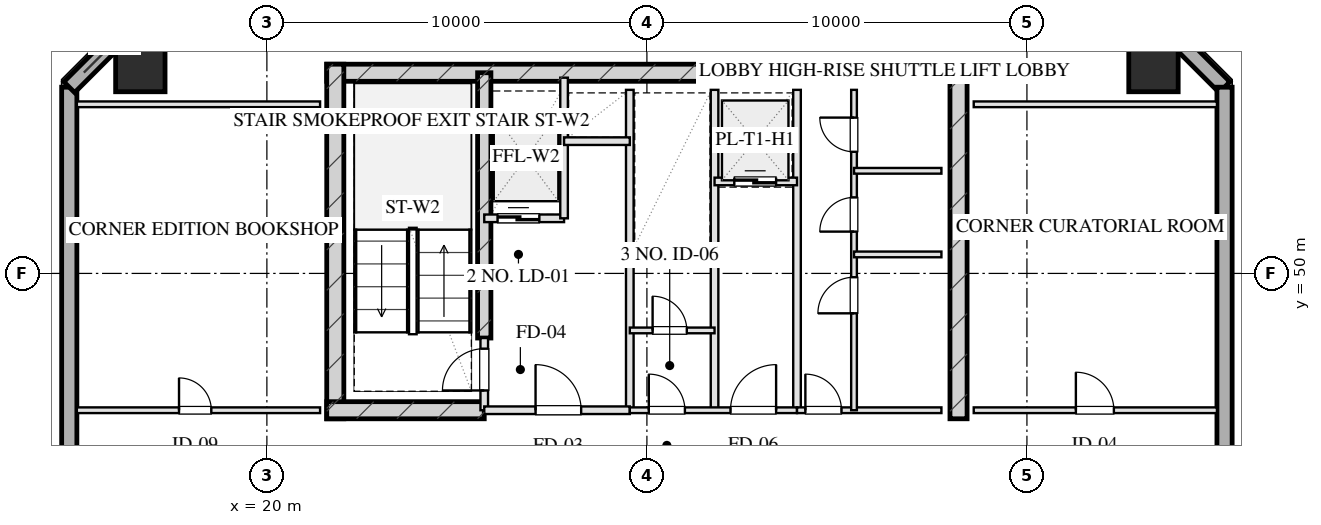
"""IFC4 building model, lengths in metres.
Left out: names, types, materials, properties, quantities, classifications, styles, units other than length and angle.
Written with IfcOpenShell. Run it as: python <this file> out.ifc"""

import sys

from ifc_helpers import new_model, si_unit, direction, frame, frame_2d, origin, origin_2d, place, context, subcontext, project, spatial, rectangle, hollow_rectangle, extrude, element, fill, save


model = new_model("IFC4")
c1 = context("Model", 3, precision=1e-05, world=origin(), true_north=direction((0.0, 1.0)))
c2 = subcontext(c1, "Body", "Model", "MODEL_VIEW")
j1 = project(units=[si_unit("LENGTHUNIT", "METRE"), si_unit("PLANEANGLEUNIT", "RADIAN")], contexts=[c1])
p1 = place(None, origin())
s1 = spatial("IfcSite", under=j1, at=p1, CompositionType="ELEMENT")
p2 = place(p1, origin())
s2 = spatial("IfcBuilding", under=s1, at=p2, CompositionType="ELEMENT")
p3 = place(p2, frame((0.0, 0.0, 244.0)))
s3 = spatial("IfcBuildingStorey", under=s2, at=p3, CompositionType="ELEMENT", Elevation=244.0)
p4 = place(p3, frame((21.575, 55.28, 0.0), z_axis=(0.0, 0.0, 1.0), x_axis=(1.0, 0.0, 0.0)))
e1 = element("IfcWall", 1, at=p4, inside=s3, PredefinedType="SHEAR", context=c2, shape_type="SweptSolid", body=[
    extrude(rectangle(XDim=16.85, YDim=0.45, at=frame_2d((8.425, 0.0))), origin(), (0.0, 0.0, 1.0), 3.2),
])
for number, where, z_axis, x_axis in (
    (2, (21.8, 46.175, 0.0), (0.0, 0.0, 1.0), (0.0, 1.0, 0.0)),
    (3, (38.2, 46.175, 0.0), (0.0, 0.0, 1.0), (0.0, 1.0, 0.0)),
):
    element("IfcWall", number, at=place(p3, frame(where, z_axis=z_axis, x_axis=x_axis)), inside=s3, PredefinedType="SHEAR", context=c2, shape_type="SweptSolid", body=[
        extrude(rectangle(XDim=9.33, YDim=0.45, at=frame_2d((4.665, 0.0))), origin(), (0.0, 0.0, 1.0), 3.2),
    ])
p5 = place(p3, frame((25.72, 48.3, 0.0), z_axis=(0.0, 0.0, 1.0), x_axis=(0.0, 1.0, 0.0)))
e4 = element("IfcWall", 4, at=p5, inside=s3, PredefinedType="SHEAR", context=c2, shape_type="SweptSolid", body=[
    extrude(rectangle(XDim=6.98, YDim=0.35, at=frame_2d((3.49, 0.0))), origin(), (0.0, 0.0, 1.0), 3.2),
])
p6 = place(p3, frame((21.575, 46.4, 0.0), z_axis=(0.0, 0.0, 1.0), x_axis=(1.0, 0.0, 0.0)))
e5 = element("IfcWall", 5, at=p6, inside=s3, PredefinedType="SHEAR", context=c2, shape_type="SweptSolid", body=[
    extrude(rectangle(XDim=4.145, YDim=0.45, at=frame_2d((2.073, 0.0))), origin(), (0.0, 0.0, 1.0), 3.2),
])
for number, where, z_axis, x_axis in (
    (6, (43.33, 55.43, 0.0), (0.0, 0.0, 1.0), (1.0, 0.0, 0.0)),
    (7, (16.67, 55.43, 0.0), (0.0, 0.0, 1.0), (1.0, 0.0, 0.0)),
):
    element("IfcColumn", number, at=place(p3, frame(where, z_axis=z_axis, x_axis=x_axis)), inside=s3, PredefinedType="COLUMN", context=c2, shape_type="SweptSolid", body=[
        extrude(hollow_rectangle(XDim=1.3, YDim=1.3, WallThickness=0.045, at=origin_2d()), origin(), (0.0, 0.0, 1.0), 3.201),
    ])
p7 = place(p3, frame((14.8, 13.1, 0.0), z_axis=(0.0, 0.0, 1.0), x_axis=(0.0, 1.0, 0.0)))
e8 = element("IfcWall", 8, at=p7, inside=s3, PredefinedType="SOLIDWALL", context=c2, shape_type="SweptSolid", body=[
    extrude(rectangle(XDim=41.8, YDim=0.4, at=frame_2d((20.9, 0.0))), origin(), (0.0, 0.0, 1.0), 2.36),
])
p8 = place(p7, frame((13.525, 0.0, 0.75)))
e9 = element("IfcOpeningElement", 9, at=p8, cuts=e8, PredefinedType="OPENING", context=c2, shape_type="SweptSolid", body=[
    extrude(rectangle(XDim=1.95, YDim=1.21, at=frame_2d((0.975, 0.605))), frame((0.0, 0.21, 0.0), z_axis=(0.0, -1.0, 0.0), x_axis=(1.0, 0.0, 0.0)), (0.0, 0.0, 1.0), 0.42),
])
p9 = place(p7, frame((17.325, 0.0, 0.75)))
e10 = element("IfcOpeningElement", 10, at=p9, cuts=e8, PredefinedType="OPENING", context=c2, shape_type="SweptSolid", body=[
    extrude(rectangle(XDim=1.95, YDim=1.21, at=frame_2d((0.975, 0.605))), frame((0.0, 0.21, 0.0), z_axis=(0.0, -1.0, 0.0), x_axis=(1.0, 0.0, 0.0)), (0.0, 0.0, 1.0), 0.42),
])
p10 = place(p7, frame((22.525, 0.0, 0.75)))
e11 = element("IfcOpeningElement", 11, at=p10, cuts=e8, PredefinedType="OPENING", context=c2, shape_type="SweptSolid", body=[
    extrude(rectangle(XDim=1.95, YDim=1.21, at=frame_2d((0.975, 0.605))), frame((0.0, 0.21, 0.0), z_axis=(0.0, -1.0, 0.0), x_axis=(1.0, 0.0, 0.0)), (0.0, 0.0, 1.0), 0.42),
])
p11 = place(p7, frame((26.325, 0.0, 0.75)))
e12 = element("IfcOpeningElement", 12, at=p11, cuts=e8, PredefinedType="OPENING", context=c2, shape_type="SweptSolid", body=[
    extrude(rectangle(XDim=1.95, YDim=1.21, at=frame_2d((0.975, 0.605))), frame((0.0, 0.21, 0.0), z_axis=(0.0, -1.0, 0.0), x_axis=(1.0, 0.0, 0.0)), (0.0, 0.0, 1.0), 0.42),
])
for number, where, z_axis, x_axis in (
    (13, (14.8, 54.9, 0.0), (0.0, 0.0, 1.0), (0.707, 0.707, 0.0)),
    (14, (42.8, 57.3, 0.0), (0.0, 0.0, 1.0), (0.707, -0.707, 0.0)),
):
    element("IfcWall", number, at=place(p3, frame(where, z_axis=z_axis, x_axis=x_axis)), inside=s3, PredefinedType="SOLIDWALL", context=c2, shape_type="SweptSolid", body=[
        extrude(rectangle(XDim=3.394, YDim=0.4, at=frame_2d((1.697, 0.0))), origin(), (0.0, 0.0, 1.0), 2.36),
    ])
p12 = place(p3, frame((45.2, 54.9, 0.0), z_axis=(0.0, 0.0, 1.0), x_axis=(0.0, -1.0, 0.0)))
e15 = element("IfcWall", 15, at=p12, inside=s3, PredefinedType="SOLIDWALL", context=c2, shape_type="SweptSolid", body=[
    extrude(rectangle(XDim=41.8, YDim=0.4, at=frame_2d((20.9, 0.0))), origin(), (0.0, 0.0, 1.0), 2.36),
])
p13 = place(p12, frame((26.325, 0.0, 0.75)))
e16 = element("IfcOpeningElement", 16, at=p13, cuts=e15, PredefinedType="OPENING", context=c2, shape_type="SweptSolid", body=[
    extrude(rectangle(XDim=1.95, YDim=1.21, at=frame_2d((0.975, 0.605))), frame((0.0, 0.21, 0.0), z_axis=(0.0, -1.0, 0.0), x_axis=(1.0, 0.0, 0.0)), (0.0, 0.0, 1.0), 0.42),
])
p14 = place(p12, frame((22.525, 0.0, 0.75)))
e17 = element("IfcOpeningElement", 17, at=p14, cuts=e15, PredefinedType="OPENING", context=c2, shape_type="SweptSolid", body=[
    extrude(rectangle(XDim=1.95, YDim=1.21, at=frame_2d((0.975, 0.605))), frame((0.0, 0.21, 0.0), z_axis=(0.0, -1.0, 0.0), x_axis=(1.0, 0.0, 0.0)), (0.0, 0.0, 1.0), 0.42),
])
p15 = place(p12, frame((17.325, 0.0, 0.75)))
e18 = element("IfcOpeningElement", 18, at=p15, cuts=e15, PredefinedType="OPENING", context=c2, shape_type="SweptSolid", body=[
    extrude(rectangle(XDim=1.95, YDim=1.21, at=frame_2d((0.975, 0.605))), frame((0.0, 0.21, 0.0), z_axis=(0.0, -1.0, 0.0), x_axis=(1.0, 0.0, 0.0)), (0.0, 0.0, 1.0), 0.42),
])
p16 = place(p12, frame((13.525, 0.0, 0.75)))
e19 = element("IfcOpeningElement", 19, at=p16, cuts=e15, PredefinedType="OPENING", context=c2, shape_type="SweptSolid", body=[
    extrude(rectangle(XDim=1.95, YDim=1.21, at=frame_2d((0.975, 0.605))), frame((0.0, 0.21, 0.0), z_axis=(0.0, -1.0, 0.0), x_axis=(1.0, 0.0, 0.0)), (0.0, 0.0, 1.0), 0.42),
])
p17 = place(p3, frame((25.72, 46.4, 0.0), z_axis=(0.0, 0.0, 1.0), x_axis=(0.0, 1.0, 0.0)))
e20 = element("IfcWall", 20, at=p17, inside=s3, PredefinedType="PARTITIONING", context=c2, shape_type="SweptSolid", body=[
    extrude(rectangle(XDim=1.9, YDim=0.2, at=frame_2d((0.95, 0.0))), origin(), (0.0, 0.0, 1.0), 2.925),
])
p18 = place(p17, frame((0.52, 0.0, 0.0)))
e21 = element("IfcOpeningElement", 21, at=p18, cuts=e20, PredefinedType="OPENING", context=c2, shape_type="SweptSolid", body=[
    extrude(rectangle(XDim=1.1, YDim=2.05, at=frame_2d((0.55, 1.025))), frame((0.0, 0.11, 0.0), z_axis=(0.0, -1.0, 0.0), x_axis=(1.0, 0.0, 0.0)), (0.0, 0.0, 1.0), 0.22),
])
p19 = place(p3, frame((29.55, 46.4, 0.0), z_axis=(0.0, 0.0, 1.0), x_axis=(0.0, 1.0, 0.0)))
e22 = element("IfcWall", 22, at=p19, inside=s3, PredefinedType="PARTITIONING", context=c2, shape_type="SweptSolid", body=[
    extrude(rectangle(XDim=8.43, YDim=0.2, at=frame_2d((4.215, 0.0))), origin(), (0.0, 0.0, 1.0), 2.925),
])
p20 = place(p3, frame((25.72, 46.4, 0.0), z_axis=(0.0, 0.0, 1.0), x_axis=(1.0, 0.0, 0.0)))
e23 = element("IfcWall", 23, at=p20, inside=s3, PredefinedType="PARTITIONING", context=c2, shape_type="SweptSolid", body=[
    extrude(rectangle(XDim=3.83, YDim=0.2, at=frame_2d((1.915, 0.0))), origin(), (0.0, 0.0, 1.0), 2.925),
])
p21 = place(p20, frame((1.35, 0.0, 0.0)))
e24 = element("IfcOpeningElement", 24, at=p21, cuts=e23, PredefinedType="OPENING", context=c2, shape_type="SweptSolid", body=[
    extrude(rectangle(XDim=1.2, YDim=2.05, at=frame_2d((0.6, 1.025))), frame((0.0, 0.11, 0.0), z_axis=(0.0, -1.0, 0.0), x_axis=(1.0, 0.0, 0.0)), (0.0, 0.0, 1.0), 0.22),
])
p22 = place(p3, frame((25.72, 51.45, 0.0), z_axis=(0.0, 0.0, 1.0), x_axis=(1.0, 0.0, 0.0)))
e25 = element("IfcWall", 25, at=p22, inside=s3, PredefinedType="PARTITIONING", context=c2, shape_type="SweptSolid", body=[
    extrude(rectangle(XDim=2.1, YDim=0.2, at=frame_2d((1.05, 0.0))), origin(), (0.0, 0.0, 1.0), 2.925),
])
p23 = place(p22, frame((0.35, 0.0, 0.0)))
e26 = element("IfcOpeningElement", 26, at=p23, cuts=e25, PredefinedType="OPENING", context=c2, shape_type="SweptSolid", body=[
    extrude(rectangle(XDim=1.1, YDim=2.05, at=frame_2d((0.55, 1.025))), frame((0.0, 0.11, 0.0), z_axis=(0.0, -1.0, 0.0), x_axis=(1.0, 0.0, 0.0)), (0.0, 0.0, 1.0), 0.22),
])
p24 = place(p3, frame((27.82, 51.45, 0.0), z_axis=(0.0, 0.0, 1.0), x_axis=(0.0, 1.0, 0.0)))
e27 = element("IfcWall", 27, at=p24, inside=s3, PredefinedType="PARTITIONING", context=c2, shape_type="SweptSolid", body=[
    extrude(rectangle(XDim=3.7, YDim=0.2, at=frame_2d((1.85, 0.0))), origin(), (0.0, 0.0, 1.0), 2.925),
])
p25 = place(p3, frame((27.82, 53.48, 0.0), z_axis=(0.0, 0.0, 1.0), x_axis=(1.0, 0.0, 0.0)))
e28 = element("IfcWall", 28, at=p25, inside=s3, PredefinedType="PARTITIONING", context=c2, shape_type="SweptSolid", body=[
    extrude(rectangle(XDim=1.73, YDim=0.2, at=frame_2d((0.865, 0.0))), origin(), (0.0, 0.0, 1.0), 2.925),
])
for number, where, z_axis, x_axis in (
    (29, (33.95, 46.4, 0.0), (0.0, 0.0, 1.0), (0.0, 1.0, 0.0)),
    (30, (31.78, 46.4, 0.0), (0.0, 0.0, 1.0), (0.0, 1.0, 0.0)),
):
    element("IfcWall", number, at=place(p3, frame(where, z_axis=z_axis, x_axis=x_axis)), inside=s3, PredefinedType="PARTITIONING", context=c2, shape_type="SweptSolid", body=[
        extrude(rectangle(XDim=8.43, YDim=0.2, at=frame_2d((4.215, 0.0))), origin(), (0.0, 0.0, 1.0), 2.925),
    ])
p26 = place(p3, frame((29.55, 46.4, 0.0), z_axis=(0.0, 0.0, 1.0), x_axis=(1.0, 0.0, 0.0)))
e31 = element("IfcWall", 31, at=p26, inside=s3, PredefinedType="PARTITIONING", context=c2, shape_type="SweptSolid", body=[
    extrude(rectangle(XDim=4.4, YDim=0.15, at=frame_2d((2.2, 0.0))), origin(), (0.0, 0.0, 1.0), 2.925),
])
p27 = place(p26, frame((0.5, 0.0, 0.0)))
e32 = element("IfcOpeningElement", 32, at=p27, cuts=e31, PredefinedType="OPENING", context=c2, shape_type="SweptSolid", body=[
    extrude(rectangle(XDim=0.95, YDim=2.05, at=frame_2d((0.475, 1.025))), frame((0.0, 0.085, 0.0), z_axis=(0.0, -1.0, 0.0), x_axis=(1.0, 0.0, 0.0)), (0.0, 0.0, 1.0), 0.17),
])
p28 = place(p26, frame((2.65, 0.0, 0.0)))
e33 = element("IfcOpeningElement", 33, at=p28, cuts=e31, PredefinedType="OPENING", context=c2, shape_type="SweptSolid", body=[
    extrude(rectangle(XDim=1.2, YDim=2.05, at=frame_2d((0.6, 1.025))), frame((0.0, 0.085, 0.0), z_axis=(0.0, -1.0, 0.0), x_axis=(1.0, 0.0, 0.0)), (0.0, 0.0, 1.0), 0.17),
])
p29 = place(p3, frame((29.55, 50.6, 0.0), z_axis=(0.0, 0.0, 1.0), x_axis=(1.0, 0.0, 0.0)))
e34 = element("IfcWall", 34, at=p29, inside=s3, PredefinedType="PARTITIONING", context=c2, shape_type="SweptSolid", body=[
    extrude(rectangle(XDim=2.23, YDim=0.15, at=frame_2d((1.115, 0.0))), origin(), (0.0, 0.0, 1.0), 2.925),
])
p30 = place(p3, frame((29.55, 48.5, 0.0), z_axis=(0.0, 0.0, 1.0), x_axis=(1.0, 0.0, 0.0)))
e35 = element("IfcWall", 35, at=p30, inside=s3, PredefinedType="PARTITIONING", context=c2, shape_type="SweptSolid", body=[
    extrude(rectangle(XDim=2.23, YDim=0.15, at=frame_2d((1.115, 0.0))), origin(), (0.0, 0.0, 1.0), 2.925),
])
p31 = place(p30, frame((0.6, 0.0, 0.0)))
e36 = element("IfcOpeningElement", 36, at=p31, cuts=e35, PredefinedType="OPENING", context=c2, shape_type="SweptSolid", body=[
    extrude(rectangle(XDim=0.9, YDim=2.05, at=frame_2d((0.45, 1.025))), frame((0.0, 0.085, 0.0), z_axis=(0.0, -1.0, 0.0), x_axis=(1.0, 0.0, 0.0)), (0.0, 0.0, 1.0), 0.17),
])
p32 = place(p3, frame((31.78, 52.42, 0.0), z_axis=(0.0, 0.0, 1.0), x_axis=(1.0, 0.0, 0.0)))
e37 = element("IfcWall", 37, at=p32, inside=s3, PredefinedType="PARTITIONING", context=c2, shape_type="SweptSolid", body=[
    extrude(rectangle(XDim=2.17, YDim=0.2, at=frame_2d((1.085, 0.0))), origin(), (0.0, 0.0, 1.0), 2.925),
])
p33 = place(p32, frame((0.52, 0.0, 0.0)))
e38 = element("IfcOpeningElement", 38, at=p33, cuts=e37, PredefinedType="OPENING", context=c2, shape_type="SweptSolid", body=[
    extrude(rectangle(XDim=1.1, YDim=2.05, at=frame_2d((0.55, 1.025))), frame((0.0, 0.11, 0.0), z_axis=(0.0, -1.0, 0.0), x_axis=(1.0, 0.0, 0.0)), (0.0, 0.0, 1.0), 0.22),
])
p34 = place(p3, frame((33.95, 46.4, 0.0), z_axis=(0.0, 0.0, 1.0), x_axis=(1.0, 0.0, 0.0)))
e39 = element("IfcWall", 39, at=p34, inside=s3, PredefinedType="PARTITIONING", context=c2, shape_type="SweptSolid", body=[
    extrude(rectangle(XDim=3.8, YDim=0.15, at=frame_2d((1.9, 0.0))), origin(), (0.0, 0.0, 1.0), 2.925),
])
p35 = place(p34, frame((0.22, 0.0, 0.0)))
e40 = element("IfcOpeningElement", 40, at=p35, cuts=e39, PredefinedType="OPENING", context=c2, shape_type="SweptSolid", body=[
    extrude(rectangle(XDim=0.95, YDim=2.05, at=frame_2d((0.475, 1.025))), frame((0.0, 0.085, 0.0), z_axis=(0.0, -1.0, 0.0), x_axis=(1.0, 0.0, 0.0)), (0.0, 0.0, 1.0), 0.17),
])
p36 = place(p3, frame((35.45, 46.4, 0.0), z_axis=(0.0, 0.0, 1.0), x_axis=(0.0, 1.0, 0.0)))
e41 = element("IfcWall", 41, at=p36, inside=s3, PredefinedType="PARTITIONING", context=c2, shape_type="SweptSolid", body=[
    extrude(rectangle(XDim=8.43, YDim=0.15, at=frame_2d((4.215, 0.0))), origin(), (0.0, 0.0, 1.0), 2.515),
])
p37 = place(p36, frame((2.55, 0.0, 0.0)))
e42 = element("IfcOpeningElement", 42, at=p37, cuts=e41, PredefinedType="OPENING", context=c2, shape_type="SweptSolid", body=[
    extrude(rectangle(XDim=0.95, YDim=2.05, at=frame_2d((0.475, 1.025))), frame((0.0, 0.085, 0.0), z_axis=(0.0, -1.0, 0.0), x_axis=(1.0, 0.0, 0.0)), (0.0, 0.0, 1.0), 0.17),
])
p38 = place(p36, frame((4.7, 0.0, 0.0)))
e43 = element("IfcOpeningElement", 43, at=p38, cuts=e41, PredefinedType="OPENING", context=c2, shape_type="SweptSolid", body=[
    extrude(rectangle(XDim=0.9, YDim=2.05, at=frame_2d((0.45, 1.025))), frame((0.0, 0.085, 0.0), z_axis=(0.0, -1.0, 0.0), x_axis=(1.0, 0.0, 0.0)), (0.0, 0.0, 1.0), 0.17),
])
p39 = place(p36, frame((6.8, 0.0, 0.0)))
e44 = element("IfcOpeningElement", 44, at=p39, cuts=e41, PredefinedType="OPENING", context=c2, shape_type="SweptSolid", body=[
    extrude(rectangle(XDim=0.9, YDim=2.05, at=frame_2d((0.45, 1.025))), frame((0.0, 0.085, 0.0), z_axis=(0.0, -1.0, 0.0), x_axis=(1.0, 0.0, 0.0)), (0.0, 0.0, 1.0), 0.17),
])
for number, where, z_axis, x_axis in (
    (45, (35.45, 50.5, 0.0), (0.0, 0.0, 1.0), (1.0, 0.0, 0.0)),
    (46, (35.45, 52.7, 0.0), (0.0, 0.0, 1.0), (1.0, 0.0, 0.0)),
):
    element("IfcWall", number, at=place(p3, frame(where, z_axis=z_axis, x_axis=x_axis)), inside=s3, PredefinedType="PARTITIONING", context=c2, shape_type="SweptSolid", body=[
        extrude(rectangle(XDim=2.3, YDim=0.15, at=frame_2d((1.15, 0.0))), origin(), (0.0, 0.0, 1.0), 2.925),
    ])
p40 = place(p3, frame((15.0, 54.45, 0.0), z_axis=(0.0, 0.0, 1.0), x_axis=(1.0, 0.0, 0.0)))
e47 = element("IfcWall", 47, at=p40, inside=s3, PredefinedType="PARTITIONING", context=c2, shape_type="SweptSolid", body=[
    extrude(rectangle(XDim=6.4, YDim=0.15, at=frame_2d((3.2, 0.0))), origin(), (0.0, 0.0, 1.0), 2.925),
])
p41 = place(p3, frame((15.0, 46.4, 0.0), z_axis=(0.0, 0.0, 1.0), x_axis=(1.0, 0.0, 0.0)))
e48 = element("IfcWall", 48, at=p41, inside=s3, PredefinedType="PARTITIONING", context=c2, shape_type="SweptSolid", body=[
    extrude(rectangle(XDim=6.4, YDim=0.15, at=frame_2d((3.2, 0.0))), origin(), (0.0, 0.0, 1.0), 2.925),
])
p42 = place(p41, frame((2.688, 0.0, 0.0)))
e49 = element("IfcOpeningElement", 49, at=p42, cuts=e48, PredefinedType="OPENING", context=c2, shape_type="SweptSolid", body=[
    extrude(rectangle(XDim=0.85, YDim=2.05, at=frame_2d((0.425, 1.025))), frame((0.0, 0.085, 0.0), z_axis=(0.0, -1.0, 0.0), x_axis=(1.0, 0.0, 0.0)), (0.0, 0.0, 1.0), 0.17),
])
p43 = place(p3, frame((38.6, 54.45, 0.0), z_axis=(0.0, 0.0, 1.0), x_axis=(1.0, 0.0, 0.0)))
e50 = element("IfcWall", 50, at=p43, inside=s3, PredefinedType="PARTITIONING", context=c2, shape_type="SweptSolid", body=[
    extrude(rectangle(XDim=6.4, YDim=0.15, at=frame_2d((3.2, 0.0))), origin(), (0.0, 0.0, 1.0), 2.925),
])
p44 = place(p3, frame((38.6, 46.4, 0.0), z_axis=(0.0, 0.0, 1.0), x_axis=(1.0, 0.0, 0.0)))
e51 = element("IfcWall", 51, at=p44, inside=s3, PredefinedType="PARTITIONING", context=c2, shape_type="SweptSolid", body=[
    extrude(rectangle(XDim=6.4, YDim=0.15, at=frame_2d((3.2, 0.0))), origin(), (0.0, 0.0, 1.0), 2.925),
])
p45 = place(p44, frame((2.688, 0.0, 0.0)))
e52 = element("IfcOpeningElement", 52, at=p45, cuts=e51, PredefinedType="OPENING", context=c2, shape_type="SweptSolid", body=[
    extrude(rectangle(XDim=1.0, YDim=2.05, at=frame_2d((0.5, 1.025))), frame((0.0, 0.085, 0.0), z_axis=(0.0, -1.0, 0.0), x_axis=(1.0, 0.0, 0.0)), (0.0, 0.0, 1.0), 0.17),
])
p46 = place(p18, origin())
e53 = element("IfcDoor", 53, at=p46, inside=s3, OperationType="SINGLE_SWING_LEFT", PredefinedType="DOOR", context=c2, shape_type="SweptSolid", body=[
    extrude(rectangle(XDim=1.1, YDim=2.05, at=frame_2d((0.55, 1.025))), frame((0.0, 0.025, 0.0), z_axis=(0.0, -1.0, 0.0), x_axis=(1.0, 0.0, 0.0)), (0.0, 0.0, 1.0), 0.05),
])
fill(e21, e53)
p47 = place(p21, origin())
e54 = element("IfcDoor", 54, at=p47, inside=s3, OperationType="SINGLE_SWING_LEFT", PredefinedType="DOOR", context=c2, shape_type="SweptSolid", body=[
    extrude(rectangle(XDim=1.2, YDim=2.05, at=frame_2d((0.6, 1.025))), frame((0.0, 0.025, 0.0), z_axis=(0.0, -1.0, 0.0), x_axis=(1.0, 0.0, 0.0)), (0.0, 0.0, 1.0), 0.05),
])
fill(e24, e54)
p48 = place(p23, origin())
e55 = element("IfcDoor", 55, at=p48, inside=s3, OperationType="DOUBLE_DOOR_SLIDING", PredefinedType="DOOR", context=c2, shape_type="SweptSolid", body=[
    extrude(rectangle(XDim=1.1, YDim=2.05, at=frame_2d((0.55, 1.025))), frame((0.0, 0.025, 0.0), z_axis=(0.0, -1.0, 0.0), x_axis=(1.0, 0.0, 0.0)), (0.0, 0.0, 1.0), 0.05),
])
fill(e26, e55)
p49 = place(p27, origin())
e56 = element("IfcDoor", 56, at=p49, inside=s3, OperationType="SINGLE_SWING_LEFT", PredefinedType="DOOR", context=c2, shape_type="SweptSolid", body=[
    extrude(rectangle(XDim=0.95, YDim=2.05, at=frame_2d((0.475, 1.025))), frame((0.0, 0.025, 0.0), z_axis=(0.0, -1.0, 0.0), x_axis=(1.0, 0.0, 0.0)), (0.0, 0.0, 1.0), 0.05),
])
fill(e32, e56)
p50 = place(p28, origin())
e57 = element("IfcDoor", 57, at=p50, inside=s3, OperationType="SINGLE_SWING_RIGHT", PredefinedType="DOOR", context=c2, shape_type="SweptSolid", body=[
    extrude(rectangle(XDim=1.2, YDim=2.05, at=frame_2d((0.6, 1.025))), frame((0.0, 0.025, 0.0), z_axis=(0.0, -1.0, 0.0), x_axis=(1.0, 0.0, 0.0)), (0.0, 0.0, 1.0), 0.05),
])
fill(e33, e57)
p51 = place(p31, origin())
e58 = element("IfcDoor", 58, at=p51, inside=s3, OperationType="SINGLE_SWING_LEFT", PredefinedType="DOOR", context=c2, shape_type="SweptSolid", body=[
    extrude(rectangle(XDim=0.9, YDim=2.05, at=frame_2d((0.45, 1.025))), frame((0.0, 0.025, 0.0), z_axis=(0.0, -1.0, 0.0), x_axis=(1.0, 0.0, 0.0)), (0.0, 0.0, 1.0), 0.05),
])
fill(e36, e58)
p52 = place(p33, origin())
e59 = element("IfcDoor", 59, at=p52, inside=s3, OperationType="DOUBLE_DOOR_SLIDING", PredefinedType="DOOR", context=c2, shape_type="SweptSolid", body=[
    extrude(rectangle(XDim=1.1, YDim=2.05, at=frame_2d((0.55, 1.025))), frame((0.0, 0.025, 0.0), z_axis=(0.0, -1.0, 0.0), x_axis=(1.0, 0.0, 0.0)), (0.0, 0.0, 1.0), 0.05),
])
fill(e38, e59)
p53 = place(p35, origin())
e60 = element("IfcDoor", 60, at=p53, inside=s3, OperationType="SINGLE_SWING_LEFT", PredefinedType="DOOR", context=c2, shape_type="SweptSolid", body=[
    extrude(rectangle(XDim=0.95, YDim=2.05, at=frame_2d((0.475, 1.025))), frame((0.0, 0.025, 0.0), z_axis=(0.0, -1.0, 0.0), x_axis=(1.0, 0.0, 0.0)), (0.0, 0.0, 1.0), 0.05),
])
fill(e40, e60)
p54 = place(p37, origin())
e61 = element("IfcDoor", 61, at=p54, inside=s3, OperationType="SINGLE_SWING_LEFT", PredefinedType="DOOR", context=c2, shape_type="SweptSolid", body=[
    extrude(rectangle(XDim=0.95, YDim=2.05, at=frame_2d((0.475, 1.025))), frame((0.0, 0.025, 0.0), z_axis=(0.0, -1.0, 0.0), x_axis=(1.0, 0.0, 0.0)), (0.0, 0.0, 1.0), 0.05),
])
fill(e42, e61)
p55 = place(p38, origin())
e62 = element("IfcDoor", 62, at=p55, inside=s3, OperationType="SINGLE_SWING_LEFT", PredefinedType="DOOR", context=c2, shape_type="SweptSolid", body=[
    extrude(rectangle(XDim=0.9, YDim=2.05, at=frame_2d((0.45, 1.025))), frame((0.0, 0.025, 0.0), z_axis=(0.0, -1.0, 0.0), x_axis=(1.0, 0.0, 0.0)), (0.0, 0.0, 1.0), 0.05),
])
fill(e43, e62)
p56 = place(p39, origin())
e63 = element("IfcDoor", 63, at=p56, inside=s3, OperationType="SINGLE_SWING_RIGHT", PredefinedType="DOOR", context=c2, shape_type="SweptSolid", body=[
    extrude(rectangle(XDim=0.9, YDim=2.05, at=frame_2d((0.45, 1.025))), frame((0.0, 0.025, 0.0), z_axis=(0.0, -1.0, 0.0), x_axis=(1.0, 0.0, 0.0)), (0.0, 0.0, 1.0), 0.05),
])
fill(e44, e63)
p57 = place(p42, origin())
e64 = element("IfcDoor", 64, at=p57, inside=s3, OperationType="SINGLE_SWING_LEFT", PredefinedType="DOOR", context=c2, shape_type="SweptSolid", body=[
    extrude(rectangle(XDim=0.85, YDim=2.05, at=frame_2d((0.425, 1.025))), frame((0.0, 0.025, 0.0), z_axis=(0.0, -1.0, 0.0), x_axis=(1.0, 0.0, 0.0)), (0.0, 0.0, 1.0), 0.05),
])
fill(e49, e64)
p58 = place(p45, origin())
e65 = element("IfcDoor", 65, at=p58, inside=s3, OperationType="SINGLE_SWING_LEFT", PredefinedType="DOOR", context=c2, shape_type="SweptSolid", body=[
    extrude(rectangle(XDim=1.0, YDim=2.05, at=frame_2d((0.5, 1.025))), frame((0.0, 0.025, 0.0), z_axis=(0.0, -1.0, 0.0), x_axis=(1.0, 0.0, 0.0)), (0.0, 0.0, 1.0), 0.05),
])
fill(e52, e65)
save(model, sys.argv[1])
